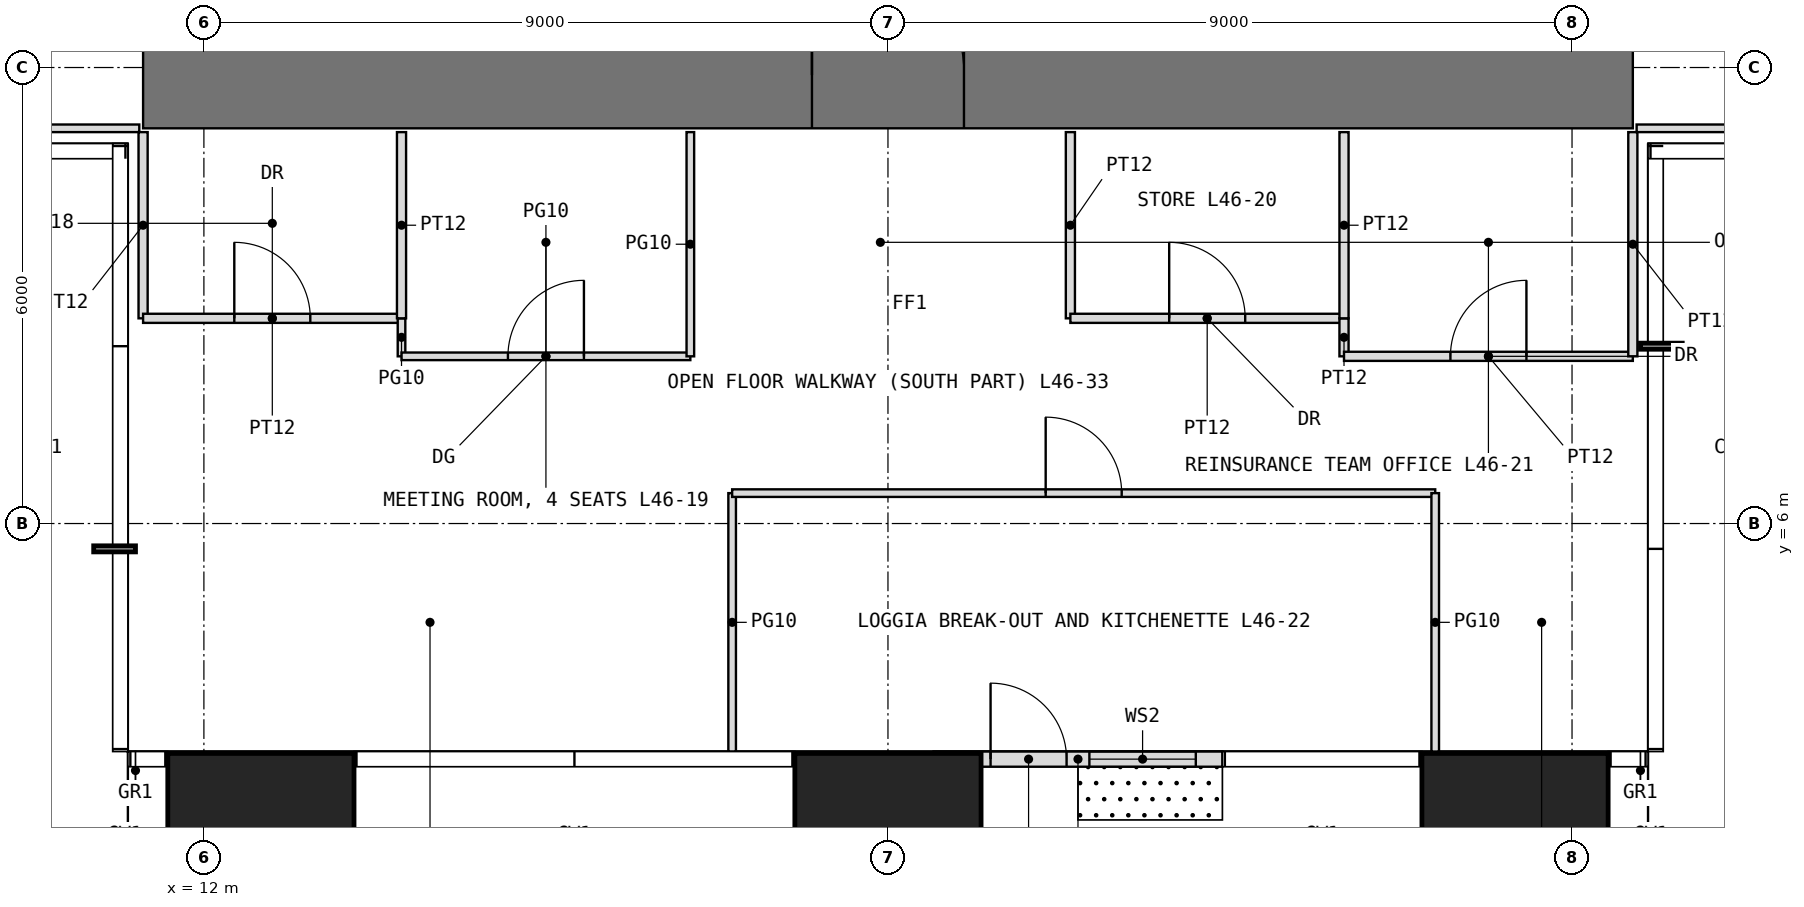
"""IFC4 building model, lengths in metres.
Left out: names, types, materials, properties, quantities, classifications, styles, units other than length and angle.
Written with IfcOpenShell. Run it as: python <this file> out.ifc"""

import sys

from ifc_helpers import new_model, si_unit, direction, frame, frame_2d, origin, origin_2d, place, context, subcontext, project, spatial, rectangle, extrude, element, fill, save


model = new_model("IFC4")
c1 = context("Model", 3, precision=1e-05, world=origin(), true_north=direction((0.0, 1.0)))
c2 = subcontext(c1, "Body", "Model", "MODEL_VIEW")
j1 = project(units=[si_unit("LENGTHUNIT", "METRE"), si_unit("PLANEANGLEUNIT", "RADIAN")], contexts=[c1])
p1 = place(None, origin())
s1 = spatial("IfcSite", under=j1, at=p1, CompositionType="ELEMENT")
p2 = place(p1, origin())
s2 = spatial("IfcBuilding", under=s1, at=p2, CompositionType="ELEMENT")
p3 = place(p2, frame((0.0, 0.0, 194.5)))
s3 = spatial("IfcBuildingStorey", under=s2, at=p3, CompositionType="ELEMENT", Elevation=194.5)
for number, where, z_axis, x_axis in (
    (1, (12.75, 1.75, 0.0), (0.0, 0.0, 1.0), (1.0, 0.0, 0.0)),
    (2, (21.0, 1.75, 0.0), (0.0, 0.0, 1.0), (1.0, 0.0, 0.0)),
    (3, (29.25, 1.75, 0.0), (0.0, 0.0, 1.0), (1.0, 0.0, 0.0)),
):
    element("IfcColumn", number, at=place(p3, frame(where, z_axis=z_axis, x_axis=x_axis)), inside=s3, PredefinedType="COLUMN", context=c2, shape_type="SweptSolid", body=[
        extrude(rectangle(XDim=2.45, YDim=2.45, at=origin_2d()), origin(), (0.0, 0.0, 1.0), 4.0),
    ])
p4 = place(p3, frame((21.6, 2.9, 0.0), z_axis=(0.0, 0.0, 1.0), x_axis=(1.0, 0.0, 0.0)))
e4 = element("IfcWall", 4, at=p4, inside=s3, PredefinedType="USERDEFINED", context=c2, shape_type="SweptSolid", body=[
    extrude(rectangle(XDim=3.8, YDim=0.2, at=frame_2d((1.9, 0.0))), origin(), (0.0, 0.0, 1.0), 3.75),
])
p5 = place(p4, frame((0.75, 0.0, 0.0)))
e5 = element("IfcOpeningElement", 5, at=p5, cuts=e4, PredefinedType="OPENING", context=c2, shape_type="SweptSolid", body=[
    extrude(rectangle(XDim=1.0, YDim=2.4, at=frame_2d((0.5, 1.2))), frame((0.0, 0.11, 0.0), z_axis=(0.0, -1.0, 0.0), x_axis=(1.0, 0.0, 0.0)), (0.0, 0.0, 1.0), 0.22),
])
p6 = place(p4, frame((2.05, 0.0, 0.3)))
e6 = element("IfcOpeningElement", 6, at=p6, cuts=e4, PredefinedType="OPENING", context=c2, shape_type="SweptSolid", body=[
    extrude(rectangle(XDim=1.4, YDim=2.7, at=frame_2d((0.7, 1.35))), frame((0.0, 0.11, 0.0), z_axis=(0.0, -1.0, 0.0), x_axis=(1.0, 0.0, 0.0)), (0.0, 0.0, 1.0), 0.22),
])
p7 = place(p3, frame((11.2, 11.9, -0.05), z_axis=(0.0, 0.0, 1.0), x_axis=(1.0, 0.0, 0.0)))
e7 = element("IfcWall", 7, at=p7, inside=s3, PredefinedType="SHEAR", context=c2, shape_type="SweptSolid", body=[
    extrude(rectangle(XDim=19.6, YDim=1.4, at=frame_2d((9.8, 0.0))), origin(), (0.0, 0.0, 1.0), 4.0),
])
p8 = place(p7, frame((8.8, 0.0, 0.05)))
e8 = element("IfcOpeningElement", 8, at=p8, cuts=e7, PredefinedType="OPENING", context=c2, shape_type="SweptSolid", body=[
    extrude(rectangle(XDim=2.0, YDim=2.2, at=frame_2d((1.0, 1.1))), frame((0.0, 0.71, 0.0), z_axis=(0.0, -1.0, 0.0), x_axis=(1.0, 0.0, 0.0)), (0.0, 0.0, 1.0), 1.42),
])
p9 = place(p3, frame((7.8, 11.2, 0.0), z_axis=(0.0, 0.0, 1.0), x_axis=(1.0, 0.0, 0.0)))
e9 = element("IfcWall", 9, at=p9, inside=s3, PredefinedType="PARTITIONING", context=c2, shape_type="SweptSolid", body=[
    extrude(rectangle(XDim=3.35, YDim=0.1, at=frame_2d((1.675, 0.0))), origin(), (0.0, 0.0, 1.0), 3.75),
])
p10 = place(p3, frame((11.2, 8.7, 0.0), z_axis=(0.0, 0.0, 1.0), x_axis=(0.0, 1.0, 0.0)))
e10 = element("IfcWall", 10, at=p10, inside=s3, PredefinedType="PARTITIONING", context=c2, shape_type="SweptSolid", body=[
    extrude(rectangle(XDim=2.45, YDim=0.12, at=frame_2d((1.225, 0.0))), origin(), (0.0, 0.0, 1.0), 3.75),
])
p11 = place(p3, frame((11.2, 8.7, 0.0), z_axis=(0.0, 0.0, 1.0), x_axis=(1.0, 0.0, 0.0)))
e11 = element("IfcWall", 11, at=p11, inside=s3, PredefinedType="PARTITIONING", context=c2, shape_type="SweptSolid", body=[
    extrude(rectangle(XDim=3.4, YDim=0.12, at=frame_2d((1.7, 0.0))), origin(), (0.0, 0.0, 1.0), 3.75),
])
p12 = place(p11, frame((1.2, 0.0, 0.0)))
e12 = element("IfcOpeningElement", 12, at=p12, cuts=e11, PredefinedType="OPENING", context=c2, shape_type="SweptSolid", body=[
    extrude(rectangle(XDim=1.0, YDim=2.2, at=frame_2d((0.5, 1.1))), frame((0.0, 0.07, 0.0), z_axis=(0.0, -1.0, 0.0), x_axis=(1.0, 0.0, 0.0)), (0.0, 0.0, 1.0), 0.14),
])
p13 = place(p3, frame((14.6, 8.2, 0.0), z_axis=(0.0, 0.0, 1.0), x_axis=(0.0, 1.0, 0.0)))
e13 = element("IfcWall", 13, at=p13, inside=s3, PredefinedType="PARTITIONING", context=c2, shape_type="SweptSolid", body=[
    extrude(rectangle(XDim=0.5, YDim=0.1, at=frame_2d((0.25, 0.0))), origin(), (0.0, 0.0, 1.0), 3.75),
])
p14 = place(p3, frame((14.6, 8.2, 0.0), z_axis=(0.0, 0.0, 1.0), x_axis=(1.0, 0.0, 0.0)))
e14 = element("IfcWall", 14, at=p14, inside=s3, PredefinedType="PARTITIONING", context=c2, shape_type="SweptSolid", body=[
    extrude(rectangle(XDim=3.8, YDim=0.1, at=frame_2d((1.9, 0.0))), origin(), (0.0, 0.0, 1.0), 3.75),
])
p15 = place(p14, frame((1.4, 0.0, 0.0)))
e15 = element("IfcOpeningElement", 15, at=p15, cuts=e14, PredefinedType="OPENING", context=c2, shape_type="SweptSolid", body=[
    extrude(rectangle(XDim=1.0, YDim=2.4, at=frame_2d((0.5, 1.2))), frame((0.0, 0.06, 0.0), z_axis=(0.0, -1.0, 0.0), x_axis=(1.0, 0.0, 0.0)), (0.0, 0.0, 1.0), 0.12),
])
p16 = place(p3, frame((14.6, 8.7, 0.0), z_axis=(0.0, 0.0, 1.0), x_axis=(0.0, 1.0, 0.0)))
e16 = element("IfcWall", 16, at=p16, inside=s3, PredefinedType="PARTITIONING", context=c2, shape_type="SweptSolid", body=[
    extrude(rectangle(XDim=2.45, YDim=0.12, at=frame_2d((1.225, 0.0))), origin(), (0.0, 0.0, 1.0), 3.75),
])
p17 = place(p3, frame((18.4, 8.2, 0.0), z_axis=(0.0, 0.0, 1.0), x_axis=(0.0, 1.0, 0.0)))
e17 = element("IfcWall", 17, at=p17, inside=s3, PredefinedType="PARTITIONING", context=c2, shape_type="SweptSolid", body=[
    extrude(rectangle(XDim=2.95, YDim=0.1, at=frame_2d((1.475, 0.0))), origin(), (0.0, 0.0, 1.0), 3.75),
])
p18 = place(p3, frame((18.95, 3.0, 0.0), z_axis=(0.0, 0.0, 1.0), x_axis=(0.0, 1.0, 0.0)))
e18 = element("IfcWall", 18, at=p18, inside=s3, PredefinedType="PARTITIONING", context=c2, shape_type="SweptSolid", body=[
    extrude(rectangle(XDim=3.4, YDim=0.1, at=frame_2d((1.7, 0.0))), origin(), (0.0, 0.0, 1.0), 3.75),
])
p19 = place(p3, frame((18.95, 6.4, 0.0), z_axis=(0.0, 0.0, 1.0), x_axis=(1.0, 0.0, 0.0)))
e19 = element("IfcWall", 19, at=p19, inside=s3, PredefinedType="PARTITIONING", context=c2, shape_type="SweptSolid", body=[
    extrude(rectangle(XDim=9.25, YDim=0.1, at=frame_2d((4.625, 0.0))), origin(), (0.0, 0.0, 1.0), 3.75),
])
p20 = place(p19, frame((4.125, 0.0, 0.0)))
e20 = element("IfcOpeningElement", 20, at=p20, cuts=e19, PredefinedType="OPENING", context=c2, shape_type="SweptSolid", body=[
    extrude(rectangle(XDim=1.0, YDim=2.4, at=frame_2d((0.5, 1.2))), frame((0.0, 0.06, 0.0), z_axis=(0.0, -1.0, 0.0), x_axis=(1.0, 0.0, 0.0)), (0.0, 0.0, 1.0), 0.12),
])
p21 = place(p3, frame((23.4, 8.7, 0.0), z_axis=(0.0, 0.0, 1.0), x_axis=(0.0, 1.0, 0.0)))
e21 = element("IfcWall", 21, at=p21, inside=s3, PredefinedType="PARTITIONING", context=c2, shape_type="SweptSolid", body=[
    extrude(rectangle(XDim=2.45, YDim=0.12, at=frame_2d((1.225, 0.0))), origin(), (0.0, 0.0, 1.0), 3.75),
])
p22 = place(p3, frame((23.4, 8.7, 0.0), z_axis=(0.0, 0.0, 1.0), x_axis=(1.0, 0.0, 0.0)))
e22 = element("IfcWall", 22, at=p22, inside=s3, PredefinedType="PARTITIONING", context=c2, shape_type="SweptSolid", body=[
    extrude(rectangle(XDim=3.6, YDim=0.12, at=frame_2d((1.8, 0.0))), origin(), (0.0, 0.0, 1.0), 3.75),
])
p23 = place(p22, frame((1.3, 0.0, 0.0)))
e23 = element("IfcOpeningElement", 23, at=p23, cuts=e22, PredefinedType="OPENING", context=c2, shape_type="SweptSolid", body=[
    extrude(rectangle(XDim=1.0, YDim=2.2, at=frame_2d((0.5, 1.1))), frame((0.0, 0.07, 0.0), z_axis=(0.0, -1.0, 0.0), x_axis=(1.0, 0.0, 0.0)), (0.0, 0.0, 1.0), 0.14),
])
p24 = place(p3, frame((27.0, 8.2, 0.0), z_axis=(0.0, 0.0, 1.0), x_axis=(0.0, 1.0, 0.0)))
e24 = element("IfcWall", 24, at=p24, inside=s3, PredefinedType="PARTITIONING", context=c2, shape_type="SweptSolid", body=[
    extrude(rectangle(XDim=0.5, YDim=0.12, at=frame_2d((0.25, 0.0))), origin(), (0.0, 0.0, 1.0), 3.75),
])
p25 = place(p3, frame((27.0, 8.2, 0.0), z_axis=(0.0, 0.0, 1.0), x_axis=(1.0, 0.0, 0.0)))
e25 = element("IfcWall", 25, at=p25, inside=s3, PredefinedType="PARTITIONING", context=c2, shape_type="SweptSolid", body=[
    extrude(rectangle(XDim=3.8, YDim=0.12, at=frame_2d((1.9, 0.0))), origin(), (0.0, 0.0, 1.0), 3.75),
])
p26 = place(p25, frame((1.4, 0.0, 0.0)))
e26 = element("IfcOpeningElement", 26, at=p26, cuts=e25, PredefinedType="OPENING", context=c2, shape_type="SweptSolid", body=[
    extrude(rectangle(XDim=1.0, YDim=2.2, at=frame_2d((0.5, 1.1))), frame((0.0, 0.07, 0.0), z_axis=(0.0, -1.0, 0.0), x_axis=(1.0, 0.0, 0.0)), (0.0, 0.0, 1.0), 0.14),
])
p27 = place(p3, frame((27.0, 8.7, 0.0), z_axis=(0.0, 0.0, 1.0), x_axis=(0.0, 1.0, 0.0)))
e27 = element("IfcWall", 27, at=p27, inside=s3, PredefinedType="PARTITIONING", context=c2, shape_type="SweptSolid", body=[
    extrude(rectangle(XDim=2.45, YDim=0.12, at=frame_2d((1.225, 0.0))), origin(), (0.0, 0.0, 1.0), 3.75),
])
p28 = place(p3, frame((28.2, 3.0, 0.0), z_axis=(0.0, 0.0, 1.0), x_axis=(0.0, 1.0, 0.0)))
e28 = element("IfcWall", 28, at=p28, inside=s3, PredefinedType="PARTITIONING", context=c2, shape_type="SweptSolid", body=[
    extrude(rectangle(XDim=3.4, YDim=0.1, at=frame_2d((1.7, 0.0))), origin(), (0.0, 0.0, 1.0), 3.75),
])
p29 = place(p3, frame((30.8, 8.2, 0.0), z_axis=(0.0, 0.0, 1.0), x_axis=(0.0, 1.0, 0.0)))
e29 = element("IfcWall", 29, at=p29, inside=s3, PredefinedType="PARTITIONING", context=c2, shape_type="SweptSolid", body=[
    extrude(rectangle(XDim=2.95, YDim=0.12, at=frame_2d((1.475, 0.0))), origin(), (0.0, 0.0, 1.0), 3.75),
])
p30 = place(p3, frame((30.85, 11.2, 0.0), z_axis=(0.0, 0.0, 1.0), x_axis=(1.0, 0.0, 0.0)))
e30 = element("IfcWall", 30, at=p30, inside=s3, PredefinedType="PARTITIONING", context=c2, shape_type="SweptSolid", body=[
    extrude(rectangle(XDim=4.75, YDim=0.1, at=frame_2d((2.375, 0.0))), origin(), (0.0, 0.0, 1.0), 3.75),
])
p31 = place(p5, origin())
e31 = element("IfcDoor", 31, at=p31, inside=s3, OperationType="SINGLE_SWING_LEFT", PredefinedType="DOOR", context=c2, shape_type="SweptSolid", body=[
    extrude(rectangle(XDim=1.0, YDim=2.4, at=frame_2d((0.5, 1.2))), frame((0.0, 0.025, 0.0), z_axis=(0.0, -1.0, 0.0), x_axis=(1.0, 0.0, 0.0)), (0.0, 0.0, 1.0), 0.05),
])
fill(e5, e31)
p32 = place(p6, origin())
e32 = element("IfcWindow", 32, at=p32, inside=s3, PartitioningType="SINGLE_PANEL", PredefinedType="WINDOW", context=c2, shape_type="SweptSolid", body=[
    extrude(rectangle(XDim=1.4, YDim=2.7, at=frame_2d((0.7, 1.35))), frame((0.0, 0.03, 0.0), z_axis=(0.0, -1.0, 0.0), x_axis=(1.0, 0.0, 0.0)), (0.0, 0.0, 1.0), 0.06),
])
fill(e6, e32)
p33 = place(p8, origin())
e33 = element("IfcDoor", 33, at=p33, inside=s3, OperationType="DOUBLE_DOOR_SINGLE_SWING", PredefinedType="DOOR", context=c2, shape_type="SweptSolid", body=[
    extrude(rectangle(XDim=2.0, YDim=2.2, at=frame_2d((1.0, 1.1))), frame((0.0, 0.025, 0.0), z_axis=(0.0, -1.0, 0.0), x_axis=(1.0, 0.0, 0.0)), (0.0, 0.0, 1.0), 0.05),
])
fill(e8, e33)
p34 = place(p12, origin())
e34 = element("IfcDoor", 34, at=p34, inside=s3, OperationType="SINGLE_SWING_LEFT", PredefinedType="DOOR", context=c2, shape_type="SweptSolid", body=[
    extrude(rectangle(XDim=1.0, YDim=2.2, at=frame_2d((0.5, 1.1))), frame((0.0, 0.025, 0.0), z_axis=(0.0, -1.0, 0.0), x_axis=(1.0, 0.0, 0.0)), (0.0, 0.0, 1.0), 0.05),
])
fill(e12, e34)
p35 = place(p15, origin())
e35 = element("IfcDoor", 35, at=p35, inside=s3, OperationType="SINGLE_SWING_RIGHT", PredefinedType="DOOR", context=c2, shape_type="SweptSolid", body=[
    extrude(rectangle(XDim=1.0, YDim=2.4, at=frame_2d((0.5, 1.2))), frame((0.0, 0.025, 0.0), z_axis=(0.0, -1.0, 0.0), x_axis=(1.0, 0.0, 0.0)), (0.0, 0.0, 1.0), 0.05),
])
fill(e15, e35)
p36 = place(p23, origin())
e36 = element("IfcDoor", 36, at=p36, inside=s3, OperationType="SINGLE_SWING_LEFT", PredefinedType="DOOR", context=c2, shape_type="SweptSolid", body=[
    extrude(rectangle(XDim=1.0, YDim=2.2, at=frame_2d((0.5, 1.1))), frame((0.0, 0.025, 0.0), z_axis=(0.0, -1.0, 0.0), x_axis=(1.0, 0.0, 0.0)), (0.0, 0.0, 1.0), 0.05),
])
fill(e23, e36)
p37 = place(p26, origin())
e37 = element("IfcDoor", 37, at=p37, inside=s3, OperationType="SINGLE_SWING_RIGHT", PredefinedType="DOOR", context=c2, shape_type="SweptSolid", body=[
    extrude(rectangle(XDim=1.0, YDim=2.2, at=frame_2d((0.5, 1.1))), frame((0.0, 0.025, 0.0), z_axis=(0.0, -1.0, 0.0), x_axis=(1.0, 0.0, 0.0)), (0.0, 0.0, 1.0), 0.05),
])
fill(e26, e37)
p38 = place(p20, origin())
e38 = element("IfcDoor", 38, at=p38, inside=s3, OperationType="SINGLE_SWING_LEFT", PredefinedType="DOOR", context=c2, shape_type="SweptSolid", body=[
    extrude(rectangle(XDim=1.0, YDim=2.4, at=frame_2d((0.5, 1.2))), frame((0.0, 0.025, 0.0), z_axis=(0.0, -1.0, 0.0), x_axis=(1.0, 0.0, 0.0)), (0.0, 0.0, 1.0), 0.05),
])
fill(e20, e38)
save(model, sys.argv[1])
